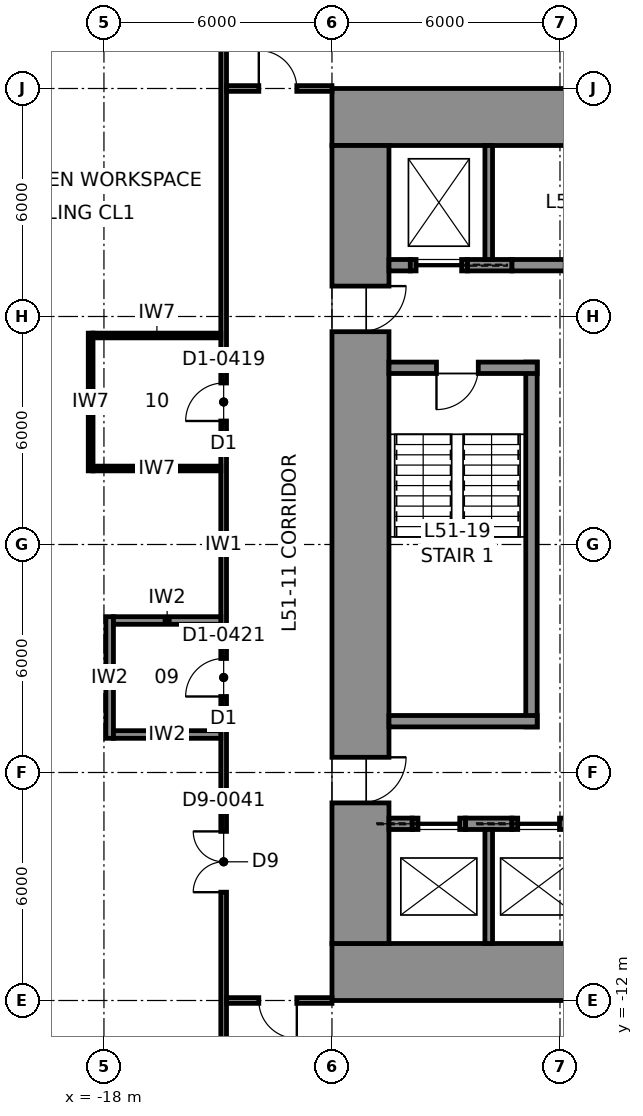
"""IFC4 building model, lengths in metres.
Left out: names, types, materials, properties, quantities, classifications, styles, units other than length and angle.
Written with IfcOpenShell. Run it as: python <this file> out.ifc"""

import sys

from ifc_helpers import new_model, si_unit, direction, frame, frame_2d, origin, place, context, subcontext, project, spatial, rectangle, extrude, element, fill, save


model = new_model("IFC4")
c1 = context("Model", 3, precision=1e-05, world=origin(), true_north=direction((0.0, 1.0)))
c2 = subcontext(c1, "Body", "Model", "MODEL_VIEW")
j1 = project(units=[si_unit("LENGTHUNIT", "METRE"), si_unit("PLANEANGLEUNIT", "RADIAN")], contexts=[c1])
p1 = place(None, origin())
s1 = spatial("IfcSite", under=j1, at=p1, CompositionType="ELEMENT")
p2 = place(p1, origin())
s2 = spatial("IfcBuilding", under=s1, at=p2, CompositionType="ELEMENT")
p3 = place(p2, frame((0.0, 0.0, 233.8)))
s3 = spatial("IfcBuildingStorey", under=s2, at=p3, CompositionType="ELEMENT", Elevation=233.8)
for number, where, z_axis, x_axis in (
    (1, (-12.0, 11.25, 0.0), (0.0, 0.0, 1.0), (1.0, 0.0, 0.0)),
    (2, (12.0, -11.25, 0.0), (0.0, 0.0, 1.0), (-1.0, 0.0, 0.0)),
):
    element("IfcWall", number, at=place(p3, frame(where, z_axis=z_axis, x_axis=x_axis)), inside=s3, PredefinedType="SHEAR", context=c2, shape_type="SweptSolid", body=[
        extrude(rectangle(XDim=24.0, YDim=1.5, at=frame_2d((12.0, 0.0))), origin(), (0.0, 0.0, 1.0), 4.0),
    ])
p4 = place(p3, frame((-11.25, -10.5, 0.0), z_axis=(0.0, 0.0, 1.0), x_axis=(0.0, 1.0, 0.0)))
e3 = element("IfcWall", 3, at=p4, inside=s3, PredefinedType="SHEAR", context=c2, shape_type="SweptSolid", body=[
    extrude(rectangle(XDim=21.0, YDim=1.5, at=frame_2d((10.5, 0.0))), origin(), (0.0, 0.0, 1.0), 4.0),
])
p5 = place(p4, frame((16.1, 0.0, 0.0)))
e4 = element("IfcOpeningElement", 4, at=p5, cuts=e3, PredefinedType="OPENING", context=c2, shape_type="SweptSolid", body=[
    extrude(rectangle(XDim=1.2, YDim=2.3, at=frame_2d((0.6, 1.15))), frame((0.0, 0.76, 0.0), z_axis=(0.0, -1.0, 0.0), x_axis=(1.0, 0.0, 0.0)), (0.0, 0.0, 1.0), 1.52),
])
p6 = place(p4, frame((3.7, 0.0, 0.0)))
e5 = element("IfcOpeningElement", 5, at=p6, cuts=e3, PredefinedType="OPENING", context=c2, shape_type="SweptSolid", body=[
    extrude(rectangle(XDim=1.2, YDim=2.3, at=frame_2d((0.6, 1.15))), frame((0.0, 0.76, 0.0), z_axis=(0.0, -1.0, 0.0), x_axis=(1.0, 0.0, 0.0)), (0.0, 0.0, 1.0), 1.52),
])
p7 = place(p3, frame((-10.5, 7.35, 0.0), z_axis=(0.0, 0.0, 1.0), x_axis=(1.0, 0.0, 0.0)))
e6 = element("IfcWall", 6, at=p7, inside=s3, PredefinedType="SHEAR", context=c2, shape_type="SweptSolid", body=[
    extrude(rectangle(XDim=0.562, YDim=0.3, at=frame_2d((0.281, 0.0))), origin(), (0.0, 0.0, 1.0), 4.0),
])
p8 = place(p3, frame((-8.438, 7.35, 0.0), z_axis=(0.0, 0.0, 1.0), x_axis=(1.0, 0.0, 0.0)))
e7 = element("IfcWall", 7, at=p8, inside=s3, PredefinedType="SHEAR", context=c2, shape_type="SweptSolid", body=[
    extrude(rectangle(XDim=1.175, YDim=0.3, at=frame_2d((0.587, 0.0))), origin(), (0.0, 0.0, 1.0), 4.0),
])
p9 = place(p3, frame((-9.938, 7.35, 0.0), z_axis=(0.0, 0.0, 1.0), x_axis=(1.0, 0.0, 0.0)))
e8 = element("IfcWall", 8, at=p9, inside=s3, PredefinedType="PARTITIONING", context=c2, shape_type="SweptSolid", body=[
    extrude(rectangle(XDim=1.5, YDim=0.3, at=frame_2d((0.75, 0.0))), origin(), (0.0, 0.0, 1.0), 4.0),
])
p10 = place(p9, frame((0.15, 0.0, 0.0)))
e9 = element("IfcOpeningElement", 9, at=p10, cuts=e8, PredefinedType="OPENING", context=c2, shape_type="SweptSolid", body=[
    extrude(rectangle(XDim=1.2, YDim=2.3, at=frame_2d((0.6, 1.15))), frame((0.0, 0.16, 0.0), z_axis=(0.0, -1.0, 0.0), x_axis=(1.0, 0.0, 0.0)), (0.0, 0.0, 1.0), 0.32),
])
p11 = place(p3, frame((-7.262, 7.35, 0.0), z_axis=(0.0, 0.0, 1.0), x_axis=(1.0, 0.0, 0.0)))
e10 = element("IfcWall", 10, at=p11, inside=s3, PredefinedType="PARTITIONING", context=c2, shape_type="SweptSolid", body=[
    extrude(rectangle(XDim=1.4, YDim=0.3, at=frame_2d((0.7, 0.0))), origin(), (0.0, 0.0, 1.0), 4.0),
])
p12 = place(p3, frame((-7.875, 7.5, 0.0), z_axis=(0.0, 0.0, 1.0), x_axis=(0.0, 1.0, 0.0)))
e11 = element("IfcWall", 11, at=p12, inside=s3, PredefinedType="PARTITIONING", context=c2, shape_type="SweptSolid", body=[
    extrude(rectangle(XDim=3.0, YDim=0.2, at=frame_2d((1.5, 0.0))), origin(), (0.0, 0.0, 1.0), 4.0),
])
p13 = place(p3, frame((-10.5, -7.35, 0.0), z_axis=(0.0, 0.0, 1.0), x_axis=(1.0, 0.0, 0.0)))
e12 = element("IfcWall", 12, at=p13, inside=s3, PredefinedType="SHEAR", context=c2, shape_type="SweptSolid", body=[
    extrude(rectangle(XDim=0.613, YDim=0.3, at=frame_2d((0.306, 0.0))), origin(), (0.0, 0.0, 1.0), 4.0),
])
p14 = place(p3, frame((-8.488, -7.35, 0.0), z_axis=(0.0, 0.0, 1.0), x_axis=(1.0, 0.0, 0.0)))
e13 = element("IfcWall", 13, at=p14, inside=s3, PredefinedType="SHEAR", context=c2, shape_type="SweptSolid", body=[
    extrude(rectangle(XDim=1.225, YDim=0.3, at=frame_2d((0.613, 0.0))), origin(), (0.0, 0.0, 1.0), 4.0),
])
p15 = place(p3, frame((-9.887, -7.35, 0.0), z_axis=(0.0, 0.0, 1.0), x_axis=(1.0, 0.0, 0.0)))
e14 = element("IfcWall", 14, at=p15, inside=s3, PredefinedType="PARTITIONING", context=c2, shape_type="SweptSolid", body=[
    extrude(rectangle(XDim=1.4, YDim=0.3, at=frame_2d((0.7, 0.0))), origin(), (0.0, 0.0, 1.0), 4.0),
])
p16 = place(p15, frame((0.15, 0.0, 0.0)))
e15 = element("IfcOpeningElement", 15, at=p16, cuts=e14, PredefinedType="OPENING", context=c2, shape_type="SweptSolid", body=[
    extrude(rectangle(XDim=1.1, YDim=2.3, at=frame_2d((0.55, 1.15))), frame((0.0, 0.16, 0.0), z_axis=(0.0, -1.0, 0.0), x_axis=(1.0, 0.0, 0.0)), (0.0, 0.0, 1.0), 0.32),
])
p17 = place(p3, frame((-7.262, -7.35, 0.0), z_axis=(0.0, 0.0, 1.0), x_axis=(1.0, 0.0, 0.0)))
e16 = element("IfcWall", 16, at=p17, inside=s3, PredefinedType="PARTITIONING", context=c2, shape_type="SweptSolid", body=[
    extrude(rectangle(XDim=1.4, YDim=0.3, at=frame_2d((0.7, 0.0))), origin(), (0.0, 0.0, 1.0), 4.0),
])
p18 = place(p17, frame((0.15, 0.0, 0.0)))
e17 = element("IfcOpeningElement", 17, at=p18, cuts=e16, PredefinedType="OPENING", context=c2, shape_type="SweptSolid", body=[
    extrude(rectangle(XDim=1.1, YDim=2.3, at=frame_2d((0.55, 1.15))), frame((0.0, 0.16, 0.0), z_axis=(0.0, -1.0, 0.0), x_axis=(1.0, 0.0, 0.0)), (0.0, 0.0, 1.0), 0.32),
])
p19 = place(p3, frame((-7.875, -10.5, 0.0), z_axis=(0.0, 0.0, 1.0), x_axis=(0.0, 1.0, 0.0)))
e18 = element("IfcWall", 18, at=p19, inside=s3, PredefinedType="PARTITIONING", context=c2, shape_type="SweptSolid", body=[
    extrude(rectangle(XDim=3.0, YDim=0.2, at=frame_2d((1.5, 0.0))), origin(), (0.0, 0.0, 1.0), 4.0),
])
p20 = place(p3, frame((-14.85, 13.575, 0.0), z_axis=(0.0, 0.0, 1.0), x_axis=(0.0, -1.0, 0.0)))
e19 = element("IfcWall", 19, at=p20, inside=s3, PredefinedType="PARTITIONING", context=c2, shape_type="SweptSolid", body=[
    extrude(rectangle(XDim=27.15, YDim=0.15, at=frame_2d((13.575, 0.0))), origin(), (0.0, 0.0, 1.0), 3.83),
])
p21 = place(p20, frame((21.125, 0.0, 0.0)))
e20 = element("IfcOpeningElement", 20, at=p21, cuts=e19, PredefinedType="OPENING", context=c2, shape_type="SweptSolid", body=[
    extrude(rectangle(XDim=1.6, YDim=2.3, at=frame_2d((0.8, 1.15))), frame((0.0, 0.085, 0.0), z_axis=(0.0, -1.0, 0.0), x_axis=(1.0, 0.0, 0.0)), (0.0, 0.0, 1.0), 0.17),
])
p22 = place(p20, frame((16.575, 0.0, 0.0)))
e21 = element("IfcOpeningElement", 21, at=p22, cuts=e19, PredefinedType="OPENING", context=c2, shape_type="SweptSolid", body=[
    extrude(rectangle(XDim=1.0, YDim=2.3, at=frame_2d((0.5, 1.15))), frame((0.0, 0.085, 0.0), z_axis=(0.0, -1.0, 0.0), x_axis=(1.0, 0.0, 0.0)), (0.0, 0.0, 1.0), 0.17),
])
p23 = place(p20, frame((9.325, 0.0, 0.0)))
e22 = element("IfcOpeningElement", 22, at=p23, cuts=e19, PredefinedType="OPENING", context=c2, shape_type="SweptSolid", body=[
    extrude(rectangle(XDim=1.0, YDim=2.3, at=frame_2d((0.5, 1.15))), frame((0.0, 0.085, 0.0), z_axis=(0.0, -1.0, 0.0), x_axis=(1.0, 0.0, 0.0)), (0.0, 0.0, 1.0), 0.17),
])
p24 = place(p3, frame((-14.775, 12.0, 0.0), z_axis=(0.0, 0.0, 1.0), x_axis=(1.0, 0.0, 0.0)))
e23 = element("IfcWall", 23, at=p24, inside=s3, PredefinedType="PARTITIONING", context=c2, shape_type="SweptSolid", body=[
    extrude(rectangle(XDim=2.775, YDim=0.15, at=frame_2d((1.387, 0.0))), origin(), (0.0, 0.0, 1.0), 3.83),
])
p25 = place(p24, frame((0.85, 0.0, 0.0)))
e24 = element("IfcOpeningElement", 24, at=p25, cuts=e23, PredefinedType="OPENING", context=c2, shape_type="SweptSolid", body=[
    extrude(rectangle(XDim=1.0, YDim=2.3, at=frame_2d((0.5, 1.15))), frame((0.0, 0.085, 0.0), z_axis=(0.0, -1.0, 0.0), x_axis=(1.0, 0.0, 0.0)), (0.0, 0.0, 1.0), 0.17),
])
p26 = place(p3, frame((-12.0, -12.0, 0.0), z_axis=(0.0, 0.0, 1.0), x_axis=(-1.0, 0.0, 0.0)))
e25 = element("IfcWall", 25, at=p26, inside=s3, PredefinedType="PARTITIONING", context=c2, shape_type="SweptSolid", body=[
    extrude(rectangle(XDim=2.775, YDim=0.15, at=frame_2d((1.387, 0.0))), origin(), (0.0, 0.0, 1.0), 3.83),
])
p27 = place(p26, frame((0.925, 0.0, 0.0)))
e26 = element("IfcOpeningElement", 26, at=p27, cuts=e25, PredefinedType="OPENING", context=c2, shape_type="SweptSolid", body=[
    extrude(rectangle(XDim=1.0, YDim=2.3, at=frame_2d((0.5, 1.15))), frame((0.0, 0.085, 0.0), z_axis=(0.0, -1.0, 0.0), x_axis=(1.0, 0.0, 0.0)), (0.0, 0.0, 1.0), 0.17),
])
p28 = place(p3, frame((-17.85, -5.1, 0.0), z_axis=(0.0, 0.0, 1.0), x_axis=(0.0, 1.0, 0.0)))
e27 = element("IfcWall", 27, at=p28, inside=s3, PredefinedType="PARTITIONING", context=c2, shape_type="SweptSolid", body=[
    extrude(rectangle(XDim=3.2, YDim=0.2, at=frame_2d((1.6, 0.0))), origin(), (0.0, 0.0, 1.0), 3.83),
])
for number, where, z_axis, x_axis in (
    (28, (-14.925, -5.0, 0.0), (0.0, 0.0, 1.0), (-1.0, 0.0, 0.0)),
    (29, (-14.925, -2.0, 0.0), (0.0, 0.0, 1.0), (-1.0, 0.0, 0.0)),
):
    element("IfcWall", number, at=place(p3, frame(where, z_axis=z_axis, x_axis=x_axis)), inside=s3, PredefinedType="PARTITIONING", context=c2, shape_type="SweptSolid", body=[
        extrude(rectangle(XDim=2.825, YDim=0.2, at=frame_2d((1.413, 0.0))), origin(), (0.0, 0.0, 1.0), 3.83),
    ])
p29 = place(p3, frame((-18.35, 1.938, 0.0), z_axis=(0.0, 0.0, 1.0), x_axis=(0.0, 1.0, 0.0)))
e30 = element("IfcWall", 30, at=p29, inside=s3, PredefinedType="PARTITIONING", context=c2, shape_type="SweptSolid", body=[
    extrude(rectangle(XDim=3.625, YDim=0.125, at=frame_2d((1.812, 0.0))), origin(), (0.0, 0.0, 1.0), 3.83),
])
for number, where, z_axis, x_axis in (
    (31, (-14.925, 2.0, 0.0), (0.0, 0.0, 1.0), (-1.0, 0.0, 0.0)),
    (32, (-14.925, 5.5, 0.0), (0.0, 0.0, 1.0), (-1.0, 0.0, 0.0)),
):
    element("IfcWall", number, at=place(p3, frame(where, z_axis=z_axis, x_axis=x_axis)), inside=s3, PredefinedType="PARTITIONING", context=c2, shape_type="SweptSolid", body=[
        extrude(rectangle(XDim=3.363, YDim=0.125, at=frame_2d((1.681, 0.0))), origin(), (0.0, 0.0, 1.0), 3.83),
    ])
p30 = place(p3, frame((-6.75, -4.8, 0.0), z_axis=(0.0, 0.0, 1.0), x_axis=(0.0, 1.0, 0.0)))
e33 = element("IfcWall", 33, at=p30, inside=s3, PredefinedType="SOLIDWALL", context=c2, shape_type="SweptSolid", body=[
    extrude(rectangle(XDim=9.6, YDim=0.3, at=frame_2d((4.8, 0.0))), origin(), (0.0, 0.0, 1.0), 3.75),
])
p31 = place(p3, frame((-10.5, 4.65, 0.0), z_axis=(0.0, 0.0, 1.0), x_axis=(1.0, 0.0, 0.0)))
e34 = element("IfcWall", 34, at=p31, inside=s3, PredefinedType="SOLIDWALL", context=c2, shape_type="SweptSolid", body=[
    extrude(rectangle(XDim=3.9, YDim=0.3, at=frame_2d((1.95, 0.0))), origin(), (0.0, 0.0, 1.0), 3.75),
])
p32 = place(p31, frame((1.25, 0.0, 0.0)))
e35 = element("IfcOpeningElement", 35, at=p32, cuts=e34, PredefinedType="OPENING", context=c2, shape_type="SweptSolid", body=[
    extrude(rectangle(XDim=1.1, YDim=2.3, at=frame_2d((0.55, 1.15))), frame((0.0, 0.16, 0.0), z_axis=(0.0, -1.0, 0.0), x_axis=(1.0, 0.0, 0.0)), (0.0, 0.0, 1.0), 0.32),
])
p33 = place(p3, frame((-6.6, -4.65, 0.0), z_axis=(0.0, 0.0, 1.0), x_axis=(-1.0, 0.0, 0.0)))
e36 = element("IfcWall", 36, at=p33, inside=s3, PredefinedType="SOLIDWALL", context=c2, shape_type="SweptSolid", body=[
    extrude(rectangle(XDim=3.9, YDim=0.3, at=frame_2d((1.95, 0.0))), origin(), (0.0, 0.0, 1.0), 3.75),
])
p34 = place(p25, origin())
e37 = element("IfcDoor", 37, at=p34, inside=s3, OperationType="SINGLE_SWING_LEFT", PredefinedType="DOOR", context=c2, shape_type="SweptSolid", body=[
    extrude(rectangle(XDim=1.0, YDim=2.3, at=frame_2d((0.5, 1.15))), frame((0.0, 0.025, 0.0), z_axis=(0.0, -1.0, 0.0), x_axis=(1.0, 0.0, 0.0)), (0.0, 0.0, 1.0), 0.05),
])
fill(e24, e37)
p35 = place(p27, origin())
e38 = element("IfcDoor", 38, at=p35, inside=s3, OperationType="SINGLE_SWING_LEFT", PredefinedType="DOOR", context=c2, shape_type="SweptSolid", body=[
    extrude(rectangle(XDim=1.0, YDim=2.3, at=frame_2d((0.5, 1.15))), frame((0.0, 0.025, 0.0), z_axis=(0.0, -1.0, 0.0), x_axis=(1.0, 0.0, 0.0)), (0.0, 0.0, 1.0), 0.05),
])
fill(e26, e38)
p36 = place(p21, frame((1.6, 0.0, 0.0), z_axis=(0.0, 0.0, 1.0), x_axis=(-1.0, 0.0, 0.0)))
e39 = element("IfcDoor", 39, at=p36, inside=s3, OperationType="DOUBLE_DOOR_SINGLE_SWING", PredefinedType="DOOR", context=c2, shape_type="SweptSolid", body=[
    extrude(rectangle(XDim=1.6, YDim=2.3, at=frame_2d((0.8, 1.15))), frame((0.0, 0.025, 0.0), z_axis=(0.0, -1.0, 0.0), x_axis=(1.0, 0.0, 0.0)), (0.0, 0.0, 1.0), 0.05),
])
fill(e20, e39)
p37 = place(p22, frame((1.0, 0.0, 0.0), z_axis=(0.0, 0.0, 1.0), x_axis=(-1.0, 0.0, 0.0)))
e40 = element("IfcDoor", 40, at=p37, inside=s3, OperationType="SINGLE_SWING_LEFT", PredefinedType="DOOR", context=c2, shape_type="SweptSolid", body=[
    extrude(rectangle(XDim=1.0, YDim=2.3, at=frame_2d((0.5, 1.15))), frame((0.0, 0.025, 0.0), z_axis=(0.0, -1.0, 0.0), x_axis=(1.0, 0.0, 0.0)), (0.0, 0.0, 1.0), 0.05),
])
fill(e21, e40)
p38 = place(p23, frame((1.0, 0.0, 0.0), z_axis=(0.0, 0.0, 1.0), x_axis=(-1.0, 0.0, 0.0)))
e41 = element("IfcDoor", 41, at=p38, inside=s3, OperationType="SINGLE_SWING_LEFT", PredefinedType="DOOR", context=c2, shape_type="SweptSolid", body=[
    extrude(rectangle(XDim=1.0, YDim=2.3, at=frame_2d((0.5, 1.15))), frame((0.0, 0.025, 0.0), z_axis=(0.0, -1.0, 0.0), x_axis=(1.0, 0.0, 0.0)), (0.0, 0.0, 1.0), 0.05),
])
fill(e22, e41)
p39 = place(p32, frame((1.1, 0.0, 0.0), z_axis=(0.0, 0.0, 1.0), x_axis=(-1.0, 0.0, 0.0)))
e42 = element("IfcDoor", 42, at=p39, inside=s3, OperationType="SINGLE_SWING_RIGHT", PredefinedType="DOOR", context=c2, shape_type="SweptSolid", body=[
    extrude(rectangle(XDim=1.1, YDim=2.3, at=frame_2d((0.55, 1.15))), frame((0.0, 0.025, 0.0), z_axis=(0.0, -1.0, 0.0), x_axis=(1.0, 0.0, 0.0)), (0.0, 0.0, 1.0), 0.05),
])
fill(e35, e42)
p40 = place(p5, frame((1.2, 0.0, 0.0), z_axis=(0.0, 0.0, 1.0), x_axis=(-1.0, 0.0, 0.0)))
e43 = element("IfcDoor", 43, at=p40, inside=s3, OperationType="SINGLE_SWING_LEFT", PredefinedType="DOOR", context=c2, shape_type="SweptSolid", body=[
    extrude(rectangle(XDim=1.2, YDim=2.3, at=frame_2d((0.6, 1.15))), frame((0.0, 0.025, 0.0), z_axis=(0.0, -1.0, 0.0), x_axis=(1.0, 0.0, 0.0)), (0.0, 0.0, 1.0), 0.05),
])
fill(e4, e43)
p41 = place(p6, frame((1.2, 0.0, 0.0), z_axis=(0.0, 0.0, 1.0), x_axis=(-1.0, 0.0, 0.0)))
e44 = element("IfcDoor", 44, at=p41, inside=s3, OperationType="SINGLE_SWING_LEFT", PredefinedType="DOOR", context=c2, shape_type="SweptSolid", body=[
    extrude(rectangle(XDim=1.2, YDim=2.3, at=frame_2d((0.6, 1.15))), frame((0.0, 0.025, 0.0), z_axis=(0.0, -1.0, 0.0), x_axis=(1.0, 0.0, 0.0)), (0.0, 0.0, 1.0), 0.05),
])
fill(e5, e44)
p42 = place(p10, frame((1.2, 0.0, 0.0), z_axis=(0.0, 0.0, 1.0), x_axis=(-1.0, 0.0, 0.0)))
e45 = element("IfcDoor", 45, at=p42, inside=s3, OperationType="SLIDING_TO_LEFT", PredefinedType="DOOR", context=c2, shape_type="SweptSolid", body=[
    extrude(rectangle(XDim=1.2, YDim=2.3, at=frame_2d((0.6, 1.15))), frame((0.0, 0.025, 0.0), z_axis=(0.0, -1.0, 0.0), x_axis=(1.0, 0.0, 0.0)), (0.0, 0.0, 1.0), 0.05),
])
fill(e9, e45)
p43 = place(p18, origin())
e46 = element("IfcDoor", 46, at=p43, inside=s3, OperationType="SLIDING_TO_LEFT", PredefinedType="DOOR", context=c2, shape_type="SweptSolid", body=[
    extrude(rectangle(XDim=1.1, YDim=2.3, at=frame_2d((0.55, 1.15))), frame((0.0, 0.025, 0.0), z_axis=(0.0, -1.0, 0.0), x_axis=(1.0, 0.0, 0.0)), (0.0, 0.0, 1.0), 0.05),
])
fill(e17, e46)
p44 = place(p16, origin())
e47 = element("IfcDoor", 47, at=p44, inside=s3, OperationType="SLIDING_TO_LEFT", PredefinedType="DOOR", context=c2, shape_type="SweptSolid", body=[
    extrude(rectangle(XDim=1.1, YDim=2.3, at=frame_2d((0.55, 1.15))), frame((0.0, 0.025, 0.0), z_axis=(0.0, -1.0, 0.0), x_axis=(1.0, 0.0, 0.0)), (0.0, 0.0, 1.0), 0.05),
])
fill(e15, e47)
save(model, sys.argv[1])
